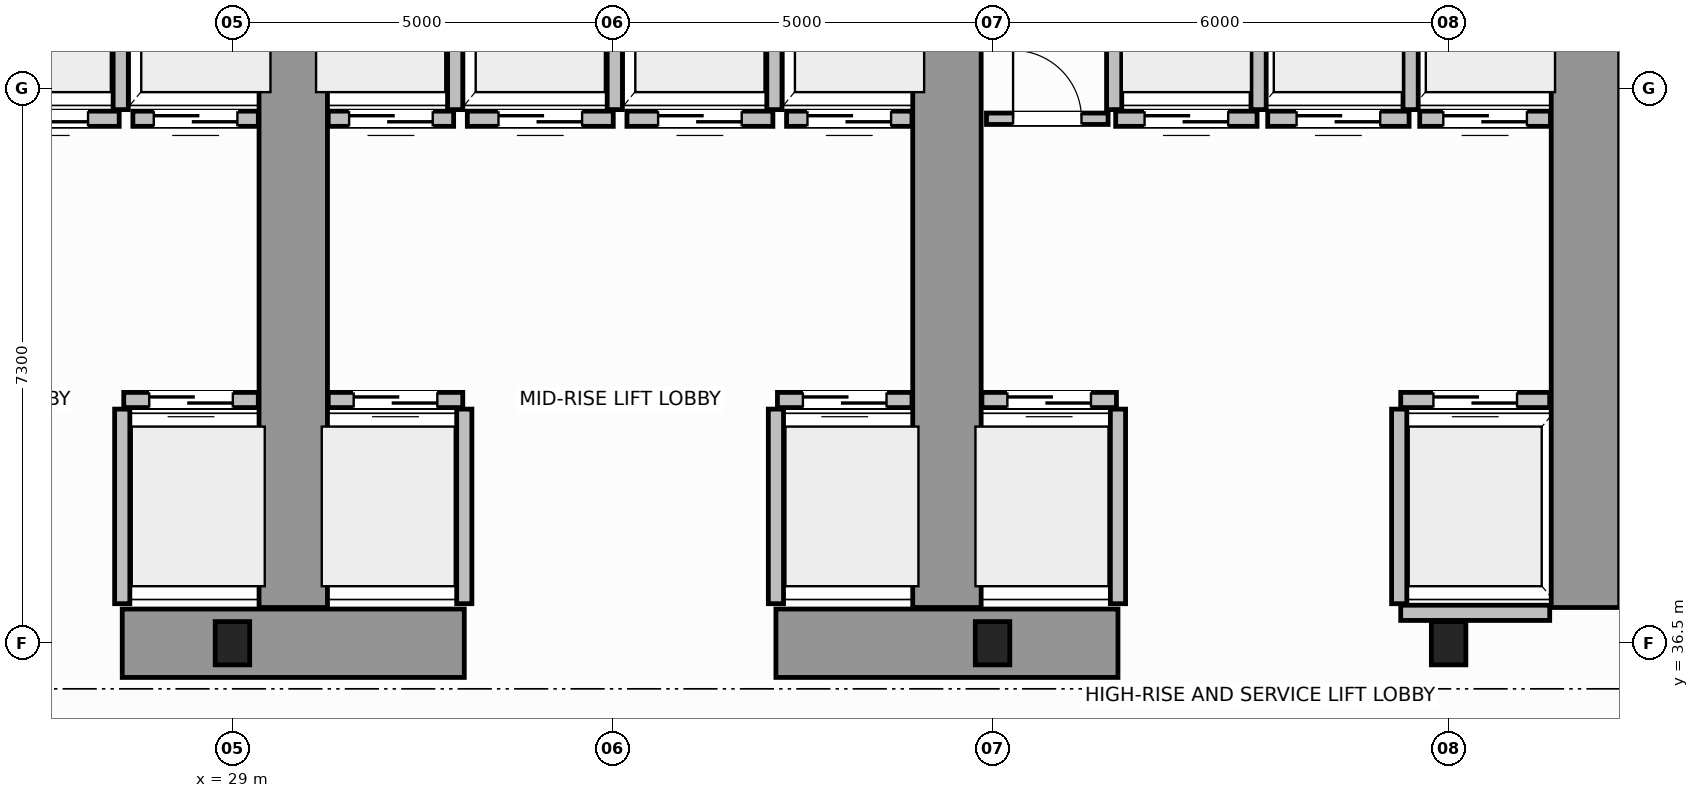
"""IFC4 building model, lengths in metres.
Left out: names, types, materials, properties, quantities, classifications, styles, units other than length and angle.
Written with IfcOpenShell. Run it as: python <this file> out.ifc"""

import sys

from ifc_helpers import new_model, si_unit, direction, frame, frame_2d, origin, origin_2d, place, context, subcontext, project, spatial, rectangle, i_section, extrude, source, transform, mapped, element, fill, save


model = new_model("IFC4")
c1 = context("Model", 3, precision=1e-05, world=origin(), true_north=direction((0.0, 1.0)))
c2 = subcontext(c1, "Body", "Model", "MODEL_VIEW")
j1 = project(units=[si_unit("LENGTHUNIT", "METRE"), si_unit("PLANEANGLEUNIT", "RADIAN")], contexts=[c1])
p1 = place(None, origin())
s1 = spatial("IfcSite", under=j1, at=p1, CompositionType="ELEMENT")
p2 = place(p1, origin())
s2 = spatial("IfcBuilding", under=s1, at=p2, CompositionType="ELEMENT")
p3 = place(p2, origin())
s3 = spatial("IfcBuildingStorey", under=s2, at=p3, CompositionType="ELEMENT", Elevation=0.0)
m1 = source(origin(), c2, "Body", "SweptSolid", [
    extrude(i_section(OverallWidth=0.454, OverallDepth=0.569, WebThickness=0.078, FlangeThickness=0.08, FilletRadius=0.015, at=origin_2d()), origin(), (0.0, 0.0, 1.0), 5.6),
])
for number, where, z_axis, x_axis in (
    (1, (29.0, 36.5, 0.0), (0.0, 0.0, 1.0), (1.0, 0.0, 0.0)),
    (2, (39.0, 36.5, 0.0), (0.0, 0.0, 1.0), (1.0, 0.0, 0.0)),
    (3, (45.0, 36.5, 0.0), (0.0, 0.0, 1.0), (1.0, 0.0, 0.0)),
):
    element("IfcColumn", number, at=place(p3, frame(where, z_axis=z_axis, x_axis=x_axis)), inside=s3, PredefinedType="COLUMN", context=c2, shape_type="MappedRepresentation", body=[
        mapped(m1, transform((0.0, 0.0, 0.0), scale=1.0)),
    ])
for number, where, z_axis, x_axis in (
    (4, (27.55, 36.5, 0.0), (0.0, 0.0, 1.0), (1.0, 0.0, 0.0)),
    (5, (36.15, 36.5, 0.0), (0.0, 0.0, 1.0), (1.0, 0.0, 0.0)),
):
    element("IfcWall", number, at=place(p3, frame(where, z_axis=z_axis, x_axis=x_axis)), inside=s3, PredefinedType="SHEAR", context=c2, shape_type="SweptSolid", body=[
        extrude(rectangle(XDim=4.5, YDim=0.9, at=frame_2d((2.25, 0.0))), origin(), (0.0, 0.0, 1.0), 5.6),
    ])
for number, where, z_axis, x_axis in (
    (6, (29.8, 36.97, 0.0), (0.0, 0.0, 1.0), (0.0, 1.0, 0.0)),
    (7, (38.4, 36.97, 0.0), (0.0, 0.0, 1.0), (0.0, 1.0, 0.0)),
    (8, (46.8, 36.97, 0.0), (0.0, 0.0, 1.0), (0.0, 1.0, 0.0)),
):
    element("IfcWall", number, at=place(p3, frame(where, z_axis=z_axis, x_axis=x_axis)), inside=s3, PredefinedType="SHEAR", context=c2, shape_type="SweptSolid", body=[
        extrude(rectangle(XDim=9.23, YDim=0.9, at=frame_2d((4.615, 0.0))), origin(), (0.0, 0.0, 1.0), 5.6),
    ])
p4 = place(p3, frame((27.57, 39.7, 0.0), z_axis=(0.0, 0.0, 1.0), x_axis=(1.0, 0.0, 0.0)))
e9 = element("IfcWall", 9, at=p4, inside=s3, PredefinedType="SOLIDWALL", context=c2, shape_type="SweptSolid", body=[
    extrude(rectangle(XDim=1.77, YDim=0.2, at=frame_2d((0.885, 0.0))), origin(), (0.0, 0.0, 1.0), 5.32),
])
p5 = place(p4, frame((0.335, 0.0, 0.0)))
e10 = element("IfcOpeningElement", 10, at=p5, cuts=e9, PredefinedType="OPENING", context=c2, shape_type="SweptSolid", body=[
    extrude(rectangle(XDim=1.1, YDim=2.15, at=frame_2d((0.55, 1.075))), frame((0.0, 0.11, 0.0), z_axis=(0.0, -1.0, 0.0), x_axis=(1.0, 0.0, 0.0)), (0.0, 0.0, 1.0), 0.22),
])
p6 = place(p3, frame((27.55, 37.02, 0.0), z_axis=(0.0, 0.0, 1.0), x_axis=(0.0, 1.0, 0.0)))
e11 = element("IfcWall", 11, at=p6, inside=s3, PredefinedType="SOLIDWALL", context=c2, shape_type="SweptSolid", body=[
    extrude(rectangle(XDim=2.56, YDim=0.2, at=frame_2d((1.28, 0.0))), origin(), (0.0, 0.0, 1.0), 5.32),
])
p7 = place(p3, frame((25.59, 43.4, 0.0), z_axis=(0.0, 0.0, 1.0), x_axis=(1.0, 0.0, 0.0)))
e12 = element("IfcWall", 12, at=p7, inside=s3, PredefinedType="SOLIDWALL", context=c2, shape_type="SweptSolid", body=[
    extrude(rectangle(XDim=1.92, YDim=0.2, at=frame_2d((0.96, 0.0))), origin(), (0.0, 0.0, 1.0), 5.32),
])
p8 = place(p7, frame((0.41, 0.0, 0.0)))
e13 = element("IfcOpeningElement", 13, at=p8, cuts=e12, PredefinedType="OPENING", context=c2, shape_type="SweptSolid", body=[
    extrude(rectangle(XDim=1.1, YDim=2.15, at=frame_2d((0.55, 1.075))), frame((0.0, 0.11, 0.0), z_axis=(0.0, -1.0, 0.0), x_axis=(1.0, 0.0, 0.0)), (0.0, 0.0, 1.0), 0.22),
])
p9 = place(p3, frame((27.53, 43.52, 0.0), z_axis=(0.0, 0.0, 1.0), x_axis=(0.0, 1.0, 0.0)))
e14 = element("IfcWall", 14, at=p9, inside=s3, PredefinedType="SOLIDWALL", context=c2, shape_type="SweptSolid", body=[
    extrude(rectangle(XDim=2.56, YDim=0.2, at=frame_2d((1.28, 0.0))), origin(), (0.0, 0.0, 1.0), 5.32),
])
p10 = place(p3, frame((27.69, 43.4, 0.0), z_axis=(0.0, 0.0, 1.0), x_axis=(1.0, 0.0, 0.0)))
e15 = element("IfcWall", 15, at=p10, inside=s3, PredefinedType="SOLIDWALL", context=c2, shape_type="SweptSolid", body=[
    extrude(rectangle(XDim=1.65, YDim=0.2, at=frame_2d((0.825, 0.0))), origin(), (0.0, 0.0, 1.0), 5.32),
])
p11 = place(p10, frame((0.275, 0.0, 0.0)))
e16 = element("IfcOpeningElement", 16, at=p11, cuts=e15, PredefinedType="OPENING", context=c2, shape_type="SweptSolid", body=[
    extrude(rectangle(XDim=1.1, YDim=2.15, at=frame_2d((0.55, 1.075))), frame((0.0, 0.11, 0.0), z_axis=(0.0, -1.0, 0.0), x_axis=(1.0, 0.0, 0.0)), (0.0, 0.0, 1.0), 0.22),
])
p12 = place(p3, frame((30.26, 39.7, 0.0), z_axis=(0.0, 0.0, 1.0), x_axis=(1.0, 0.0, 0.0)))
e17 = element("IfcWall", 17, at=p12, inside=s3, PredefinedType="SOLIDWALL", context=c2, shape_type="SweptSolid", body=[
    extrude(rectangle(XDim=1.77, YDim=0.2, at=frame_2d((0.885, 0.0))), origin(), (0.0, 0.0, 1.0), 5.32),
])
p13 = place(p12, frame((0.335, 0.0, 0.0)))
e18 = element("IfcOpeningElement", 18, at=p13, cuts=e17, PredefinedType="OPENING", context=c2, shape_type="SweptSolid", body=[
    extrude(rectangle(XDim=1.1, YDim=2.15, at=frame_2d((0.55, 1.075))), frame((0.0, 0.11, 0.0), z_axis=(0.0, -1.0, 0.0), x_axis=(1.0, 0.0, 0.0)), (0.0, 0.0, 1.0), 0.22),
])
p14 = place(p3, frame((32.05, 37.02, 0.0), z_axis=(0.0, 0.0, 1.0), x_axis=(0.0, 1.0, 0.0)))
e19 = element("IfcWall", 19, at=p14, inside=s3, PredefinedType="SOLIDWALL", context=c2, shape_type="SweptSolid", body=[
    extrude(rectangle(XDim=2.56, YDim=0.2, at=frame_2d((1.28, 0.0))), origin(), (0.0, 0.0, 1.0), 5.32),
])
p15 = place(p3, frame((36.17, 39.7, 0.0), z_axis=(0.0, 0.0, 1.0), x_axis=(1.0, 0.0, 0.0)))
e20 = element("IfcWall", 20, at=p15, inside=s3, PredefinedType="SOLIDWALL", context=c2, shape_type="SweptSolid", body=[
    extrude(rectangle(XDim=1.77, YDim=0.2, at=frame_2d((0.885, 0.0))), origin(), (0.0, 0.0, 1.0), 5.32),
])
p16 = place(p15, frame((0.335, 0.0, 0.0)))
e21 = element("IfcOpeningElement", 21, at=p16, cuts=e20, PredefinedType="OPENING", context=c2, shape_type="SweptSolid", body=[
    extrude(rectangle(XDim=1.1, YDim=2.15, at=frame_2d((0.55, 1.075))), frame((0.0, 0.11, 0.0), z_axis=(0.0, -1.0, 0.0), x_axis=(1.0, 0.0, 0.0)), (0.0, 0.0, 1.0), 0.22),
])
p17 = place(p3, frame((36.15, 37.02, 0.0), z_axis=(0.0, 0.0, 1.0), x_axis=(0.0, 1.0, 0.0)))
e22 = element("IfcWall", 22, at=p17, inside=s3, PredefinedType="SOLIDWALL", context=c2, shape_type="SweptSolid", body=[
    extrude(rectangle(XDim=2.56, YDim=0.2, at=frame_2d((1.28, 0.0))), origin(), (0.0, 0.0, 1.0), 5.32),
])
p18 = place(p3, frame((30.26, 43.4, 0.0), z_axis=(0.0, 0.0, 1.0), x_axis=(1.0, 0.0, 0.0)))
e23 = element("IfcWall", 23, at=p18, inside=s3, PredefinedType="SOLIDWALL", context=c2, shape_type="SweptSolid", body=[
    extrude(rectangle(XDim=1.65, YDim=0.2, at=frame_2d((0.825, 0.0))), origin(), (0.0, 0.0, 1.0), 5.32),
])
p19 = place(p18, frame((0.275, 0.0, 0.0)))
e24 = element("IfcOpeningElement", 24, at=p19, cuts=e23, PredefinedType="OPENING", context=c2, shape_type="SweptSolid", body=[
    extrude(rectangle(XDim=1.1, YDim=2.15, at=frame_2d((0.55, 1.075))), frame((0.0, 0.11, 0.0), z_axis=(0.0, -1.0, 0.0), x_axis=(1.0, 0.0, 0.0)), (0.0, 0.0, 1.0), 0.22),
])
p20 = place(p3, frame((31.93, 43.52, 0.0), z_axis=(0.0, 0.0, 1.0), x_axis=(0.0, 1.0, 0.0)))
e25 = element("IfcWall", 25, at=p20, inside=s3, PredefinedType="SOLIDWALL", context=c2, shape_type="SweptSolid", body=[
    extrude(rectangle(XDim=2.56, YDim=0.2, at=frame_2d((1.28, 0.0))), origin(), (0.0, 0.0, 1.0), 5.32),
])
p21 = place(p3, frame((32.09, 43.4, 0.0), z_axis=(0.0, 0.0, 1.0), x_axis=(1.0, 0.0, 0.0)))
e26 = element("IfcWall", 26, at=p21, inside=s3, PredefinedType="SOLIDWALL", context=c2, shape_type="SweptSolid", body=[
    extrude(rectangle(XDim=1.92, YDim=0.2, at=frame_2d((0.96, 0.0))), origin(), (0.0, 0.0, 1.0), 5.32),
])
p22 = place(p21, frame((0.41, 0.0, 0.0)))
e27 = element("IfcOpeningElement", 27, at=p22, cuts=e26, PredefinedType="OPENING", context=c2, shape_type="SweptSolid", body=[
    extrude(rectangle(XDim=1.1, YDim=2.15, at=frame_2d((0.55, 1.075))), frame((0.0, 0.11, 0.0), z_axis=(0.0, -1.0, 0.0), x_axis=(1.0, 0.0, 0.0)), (0.0, 0.0, 1.0), 0.22),
])
p23 = place(p3, frame((34.03, 43.52, 0.0), z_axis=(0.0, 0.0, 1.0), x_axis=(0.0, 1.0, 0.0)))
e28 = element("IfcWall", 28, at=p23, inside=s3, PredefinedType="SOLIDWALL", context=c2, shape_type="SweptSolid", body=[
    extrude(rectangle(XDim=2.56, YDim=0.2, at=frame_2d((1.28, 0.0))), origin(), (0.0, 0.0, 1.0), 5.32),
])
p24 = place(p3, frame((34.19, 43.4, 0.0), z_axis=(0.0, 0.0, 1.0), x_axis=(1.0, 0.0, 0.0)))
e29 = element("IfcWall", 29, at=p24, inside=s3, PredefinedType="SOLIDWALL", context=c2, shape_type="SweptSolid", body=[
    extrude(rectangle(XDim=1.92, YDim=0.2, at=frame_2d((0.96, 0.0))), origin(), (0.0, 0.0, 1.0), 5.32),
])
p25 = place(p24, frame((0.41, 0.0, 0.0)))
e30 = element("IfcOpeningElement", 30, at=p25, cuts=e29, PredefinedType="OPENING", context=c2, shape_type="SweptSolid", body=[
    extrude(rectangle(XDim=1.1, YDim=2.15, at=frame_2d((0.55, 1.075))), frame((0.0, 0.11, 0.0), z_axis=(0.0, -1.0, 0.0), x_axis=(1.0, 0.0, 0.0)), (0.0, 0.0, 1.0), 0.22),
])
p26 = place(p3, frame((36.13, 43.52, 0.0), z_axis=(0.0, 0.0, 1.0), x_axis=(0.0, 1.0, 0.0)))
e31 = element("IfcWall", 31, at=p26, inside=s3, PredefinedType="SOLIDWALL", context=c2, shape_type="SweptSolid", body=[
    extrude(rectangle(XDim=2.56, YDim=0.2, at=frame_2d((1.28, 0.0))), origin(), (0.0, 0.0, 1.0), 5.32),
])
p27 = place(p3, frame((36.29, 43.4, 0.0), z_axis=(0.0, 0.0, 1.0), x_axis=(1.0, 0.0, 0.0)))
e32 = element("IfcWall", 32, at=p27, inside=s3, PredefinedType="SOLIDWALL", context=c2, shape_type="SweptSolid", body=[
    extrude(rectangle(XDim=1.65, YDim=0.2, at=frame_2d((0.825, 0.0))), origin(), (0.0, 0.0, 1.0), 5.32),
])
p28 = place(p27, frame((0.275, 0.0, 0.0)))
e33 = element("IfcOpeningElement", 33, at=p28, cuts=e32, PredefinedType="OPENING", context=c2, shape_type="SweptSolid", body=[
    extrude(rectangle(XDim=1.1, YDim=2.15, at=frame_2d((0.55, 1.075))), frame((0.0, 0.11, 0.0), z_axis=(0.0, -1.0, 0.0), x_axis=(1.0, 0.0, 0.0)), (0.0, 0.0, 1.0), 0.22),
])
p29 = place(p3, frame((38.86, 39.7, 0.0), z_axis=(0.0, 0.0, 1.0), x_axis=(1.0, 0.0, 0.0)))
e34 = element("IfcWall", 34, at=p29, inside=s3, PredefinedType="SOLIDWALL", context=c2, shape_type="SweptSolid", body=[
    extrude(rectangle(XDim=1.77, YDim=0.2, at=frame_2d((0.885, 0.0))), origin(), (0.0, 0.0, 1.0), 5.32),
])
p30 = place(p29, frame((0.335, 0.0, 0.0)))
e35 = element("IfcOpeningElement", 35, at=p30, cuts=e34, PredefinedType="OPENING", context=c2, shape_type="SweptSolid", body=[
    extrude(rectangle(XDim=1.1, YDim=2.15, at=frame_2d((0.55, 1.075))), frame((0.0, 0.11, 0.0), z_axis=(0.0, -1.0, 0.0), x_axis=(1.0, 0.0, 0.0)), (0.0, 0.0, 1.0), 0.22),
])
p31 = place(p3, frame((40.65, 37.02, 0.0), z_axis=(0.0, 0.0, 1.0), x_axis=(0.0, 1.0, 0.0)))
e36 = element("IfcWall", 36, at=p31, inside=s3, PredefinedType="SOLIDWALL", context=c2, shape_type="SweptSolid", body=[
    extrude(rectangle(XDim=2.56, YDim=0.2, at=frame_2d((1.28, 0.0))), origin(), (0.0, 0.0, 1.0), 5.32),
])
p32 = place(p3, frame((44.37, 39.7, 0.0), z_axis=(0.0, 0.0, 1.0), x_axis=(1.0, 0.0, 0.0)))
e37 = element("IfcWall", 37, at=p32, inside=s3, PredefinedType="SOLIDWALL", context=c2, shape_type="SweptSolid", body=[
    extrude(rectangle(XDim=1.96, YDim=0.2, at=frame_2d((0.98, 0.0))), origin(), (0.0, 0.0, 1.0), 5.32),
])
p33 = place(p32, frame((0.43, 0.0, 0.0)))
e38 = element("IfcOpeningElement", 38, at=p33, cuts=e37, PredefinedType="OPENING", context=c2, shape_type="SweptSolid", body=[
    extrude(rectangle(XDim=1.1, YDim=2.15, at=frame_2d((0.55, 1.075))), frame((0.0, 0.11, 0.0), z_axis=(0.0, -1.0, 0.0), x_axis=(1.0, 0.0, 0.0)), (0.0, 0.0, 1.0), 0.22),
])
p34 = place(p3, frame((44.37, 36.9, 0.0), z_axis=(0.0, 0.0, 1.0), x_axis=(1.0, 0.0, 0.0)))
e39 = element("IfcWall", 39, at=p34, inside=s3, PredefinedType="SOLIDWALL", context=c2, shape_type="SweptSolid", body=[
    extrude(rectangle(XDim=1.96, YDim=0.2, at=frame_2d((0.98, 0.0))), origin(), (0.0, 0.0, 1.0), 4.11),
])
p35 = place(p3, frame((44.35, 37.02, 0.0), z_axis=(0.0, 0.0, 1.0), x_axis=(0.0, 1.0, 0.0)))
e40 = element("IfcWall", 40, at=p35, inside=s3, PredefinedType="SOLIDWALL", context=c2, shape_type="SweptSolid", body=[
    extrude(rectangle(XDim=2.56, YDim=0.2, at=frame_2d((1.28, 0.0))), origin(), (0.0, 0.0, 1.0), 5.32),
])
p36 = place(p3, frame((40.62, 43.4, 0.0), z_axis=(0.0, 0.0, 1.0), x_axis=(1.0, 0.0, 0.0)))
e41 = element("IfcWall", 41, at=p36, inside=s3, PredefinedType="SOLIDWALL", context=c2, shape_type="SweptSolid", body=[
    extrude(rectangle(XDim=1.86, YDim=0.2, at=frame_2d((0.93, 0.0))), origin(), (0.0, 0.0, 1.0), 5.32),
])
p37 = place(p36, frame((0.38, 0.0, 0.0)))
e42 = element("IfcOpeningElement", 42, at=p37, cuts=e41, PredefinedType="OPENING", context=c2, shape_type="SweptSolid", body=[
    extrude(rectangle(XDim=1.1, YDim=2.15, at=frame_2d((0.55, 1.075))), frame((0.0, 0.11, 0.0), z_axis=(0.0, -1.0, 0.0), x_axis=(1.0, 0.0, 0.0)), (0.0, 0.0, 1.0), 0.22),
])
for number, where, z_axis, x_axis in (
    (43, (40.6, 43.52, 0.0), (0.0, 0.0, 1.0), (0.0, 1.0, 0.0)),
    (44, (42.5, 43.52, 0.0), (0.0, 0.0, 1.0), (0.0, 1.0, 0.0)),
):
    element("IfcWall", number, at=place(p3, frame(where, z_axis=z_axis, x_axis=x_axis)), inside=s3, PredefinedType="SOLIDWALL", context=c2, shape_type="SweptSolid", body=[
        extrude(rectangle(XDim=2.56, YDim=0.2, at=frame_2d((1.28, 0.0))), origin(), (0.0, 0.0, 1.0), 5.32),
    ])
p38 = place(p3, frame((42.62, 43.4, 0.0), z_axis=(0.0, 0.0, 1.0), x_axis=(1.0, 0.0, 0.0)))
e45 = element("IfcWall", 45, at=p38, inside=s3, PredefinedType="SOLIDWALL", context=c2, shape_type="SweptSolid", body=[
    extrude(rectangle(XDim=1.86, YDim=0.2, at=frame_2d((0.93, 0.0))), origin(), (0.0, 0.0, 1.0), 5.32),
])
p39 = place(p38, frame((0.38, 0.0, 0.0)))
e46 = element("IfcOpeningElement", 46, at=p39, cuts=e45, PredefinedType="OPENING", context=c2, shape_type="SweptSolid", body=[
    extrude(rectangle(XDim=1.1, YDim=2.15, at=frame_2d((0.55, 1.075))), frame((0.0, 0.11, 0.0), z_axis=(0.0, -1.0, 0.0), x_axis=(1.0, 0.0, 0.0)), (0.0, 0.0, 1.0), 0.22),
])
p40 = place(p3, frame((44.5, 43.52, 0.0), z_axis=(0.0, 0.0, 1.0), x_axis=(0.0, 1.0, 0.0)))
e47 = element("IfcWall", 47, at=p40, inside=s3, PredefinedType="SOLIDWALL", context=c2, shape_type="SweptSolid", body=[
    extrude(rectangle(XDim=2.56, YDim=0.2, at=frame_2d((1.28, 0.0))), origin(), (0.0, 0.0, 1.0), 5.32),
])
p41 = place(p3, frame((44.62, 43.4, 0.0), z_axis=(0.0, 0.0, 1.0), x_axis=(1.0, 0.0, 0.0)))
e48 = element("IfcWall", 48, at=p41, inside=s3, PredefinedType="SOLIDWALL", context=c2, shape_type="SweptSolid", body=[
    extrude(rectangle(XDim=1.72, YDim=0.2, at=frame_2d((0.86, 0.0))), origin(), (0.0, 0.0, 1.0), 5.32),
])
p42 = place(p41, frame((0.31, 0.0, 0.0)))
e49 = element("IfcOpeningElement", 49, at=p42, cuts=e48, PredefinedType="OPENING", context=c2, shape_type="SweptSolid", body=[
    extrude(rectangle(XDim=1.1, YDim=2.15, at=frame_2d((0.55, 1.075))), frame((0.0, 0.11, 0.0), z_axis=(0.0, -1.0, 0.0), x_axis=(1.0, 0.0, 0.0)), (0.0, 0.0, 1.0), 0.22),
])
p43 = place(p3, frame((38.92, 43.4, 0.0), z_axis=(0.0, 0.0, 1.0), x_axis=(1.0, 0.0, 0.0)))
e50 = element("IfcWall", 50, at=p43, inside=s3, PredefinedType="PARTITIONING", context=c2, shape_type="SweptSolid", body=[
    extrude(rectangle(XDim=1.6, YDim=0.15, at=frame_2d((0.8, 0.0))), origin(), (0.0, 0.0, 1.0), 5.32),
])
p44 = place(p43, frame((0.35, 0.0, 0.0)))
e51 = element("IfcOpeningElement", 51, at=p44, cuts=e50, PredefinedType="OPENING", context=c2, shape_type="SweptSolid", body=[
    extrude(rectangle(XDim=0.9, YDim=2.1, at=frame_2d((0.45, 1.05))), frame((0.0, 0.085, 0.0), z_axis=(0.0, -1.0, 0.0), x_axis=(1.0, 0.0, 0.0)), (0.0, 0.0, 1.0), 0.17),
])
m2 = source(origin(), c2, "Body", "SweptSolid", [
    extrude(rectangle(XDim=1.1, YDim=2.15, at=frame_2d((0.55, 1.075))), frame((0.0, 0.025, 0.0), z_axis=(0.0, -1.0, 0.0), x_axis=(1.0, 0.0, 0.0)), (0.0, 0.0, 1.0), 0.05),
])
p45 = place(p5, origin())
e52 = element("IfcDoor", 52, at=p45, inside=s3, OperationType="DOUBLE_DOOR_SLIDING", PredefinedType="DOOR", context=c2, shape_type="MappedRepresentation", body=[
    mapped(m2, transform((0.0, 0.0, 0.0), scale=1.0)),
])
fill(e10, e52)
p46 = place(p8, origin())
e53 = element("IfcDoor", 53, at=p46, inside=s3, OperationType="DOUBLE_DOOR_SLIDING", PredefinedType="DOOR", context=c2, shape_type="MappedRepresentation", body=[
    mapped(m2, transform((0.0, 0.0, 0.0), scale=1.0)),
])
fill(e13, e53)
p47 = place(p11, origin())
e54 = element("IfcDoor", 54, at=p47, inside=s3, OperationType="DOUBLE_DOOR_SLIDING", PredefinedType="DOOR", context=c2, shape_type="MappedRepresentation", body=[
    mapped(m2, transform((0.0, 0.0, 0.0), scale=1.0)),
])
fill(e16, e54)
p48 = place(p13, origin())
e55 = element("IfcDoor", 55, at=p48, inside=s3, OperationType="DOUBLE_DOOR_SLIDING", PredefinedType="DOOR", context=c2, shape_type="MappedRepresentation", body=[
    mapped(m2, transform((0.0, 0.0, 0.0), scale=1.0)),
])
fill(e18, e55)
p49 = place(p16, origin())
e56 = element("IfcDoor", 56, at=p49, inside=s3, OperationType="DOUBLE_DOOR_SLIDING", PredefinedType="DOOR", context=c2, shape_type="MappedRepresentation", body=[
    mapped(m2, transform((0.0, 0.0, 0.0), scale=1.0)),
])
fill(e21, e56)
p50 = place(p19, origin())
e57 = element("IfcDoor", 57, at=p50, inside=s3, OperationType="DOUBLE_DOOR_SLIDING", PredefinedType="DOOR", context=c2, shape_type="MappedRepresentation", body=[
    mapped(m2, transform((0.0, 0.0, 0.0), scale=1.0)),
])
fill(e24, e57)
p51 = place(p22, origin())
e58 = element("IfcDoor", 58, at=p51, inside=s3, OperationType="DOUBLE_DOOR_SLIDING", PredefinedType="DOOR", context=c2, shape_type="MappedRepresentation", body=[
    mapped(m2, transform((0.0, 0.0, 0.0), scale=1.0)),
])
fill(e27, e58)
p52 = place(p25, origin())
e59 = element("IfcDoor", 59, at=p52, inside=s3, OperationType="DOUBLE_DOOR_SLIDING", PredefinedType="DOOR", context=c2, shape_type="MappedRepresentation", body=[
    mapped(m2, transform((0.0, 0.0, 0.0), scale=1.0)),
])
fill(e30, e59)
p53 = place(p28, origin())
e60 = element("IfcDoor", 60, at=p53, inside=s3, OperationType="DOUBLE_DOOR_SLIDING", PredefinedType="DOOR", context=c2, shape_type="MappedRepresentation", body=[
    mapped(m2, transform((0.0, 0.0, 0.0), scale=1.0)),
])
fill(e33, e60)
p54 = place(p30, origin())
e61 = element("IfcDoor", 61, at=p54, inside=s3, OperationType="DOUBLE_DOOR_SLIDING", PredefinedType="DOOR", context=c2, shape_type="MappedRepresentation", body=[
    mapped(m2, transform((0.0, 0.0, 0.0), scale=1.0)),
])
fill(e35, e61)
p55 = place(p33, origin())
e62 = element("IfcDoor", 62, at=p55, inside=s3, OperationType="DOUBLE_DOOR_SLIDING", PredefinedType="DOOR", context=c2, shape_type="MappedRepresentation", body=[
    mapped(m2, transform((0.0, 0.0, 0.0), scale=1.0)),
])
fill(e38, e62)
p56 = place(p37, origin())
e63 = element("IfcDoor", 63, at=p56, inside=s3, OperationType="DOUBLE_DOOR_SLIDING", PredefinedType="DOOR", context=c2, shape_type="MappedRepresentation", body=[
    mapped(m2, transform((0.0, 0.0, 0.0), scale=1.0)),
])
fill(e42, e63)
p57 = place(p39, origin())
e64 = element("IfcDoor", 64, at=p57, inside=s3, OperationType="DOUBLE_DOOR_SLIDING", PredefinedType="DOOR", context=c2, shape_type="MappedRepresentation", body=[
    mapped(m2, transform((0.0, 0.0, 0.0), scale=1.0)),
])
fill(e46, e64)
p58 = place(p42, origin())
e65 = element("IfcDoor", 65, at=p58, inside=s3, OperationType="DOUBLE_DOOR_SLIDING", PredefinedType="DOOR", context=c2, shape_type="MappedRepresentation", body=[
    mapped(m2, transform((0.0, 0.0, 0.0), scale=1.0)),
])
fill(e49, e65)
m3 = source(origin(), c2, "Body", "SweptSolid", [
    extrude(rectangle(XDim=0.9, YDim=2.1, at=frame_2d((0.45, 1.05))), frame((0.0, 0.025, 0.0), z_axis=(0.0, -1.0, 0.0), x_axis=(1.0, 0.0, 0.0)), (0.0, 0.0, 1.0), 0.05),
])
p59 = place(p44, origin())
e66 = element("IfcDoor", 66, at=p59, inside=s3, OperationType="SINGLE_SWING_LEFT", PredefinedType="DOOR", context=c2, shape_type="MappedRepresentation", body=[
    mapped(m3, transform((0.0, 0.0, 0.0), scale=1.0)),
])
fill(e51, e66)
save(model, sys.argv[1])
